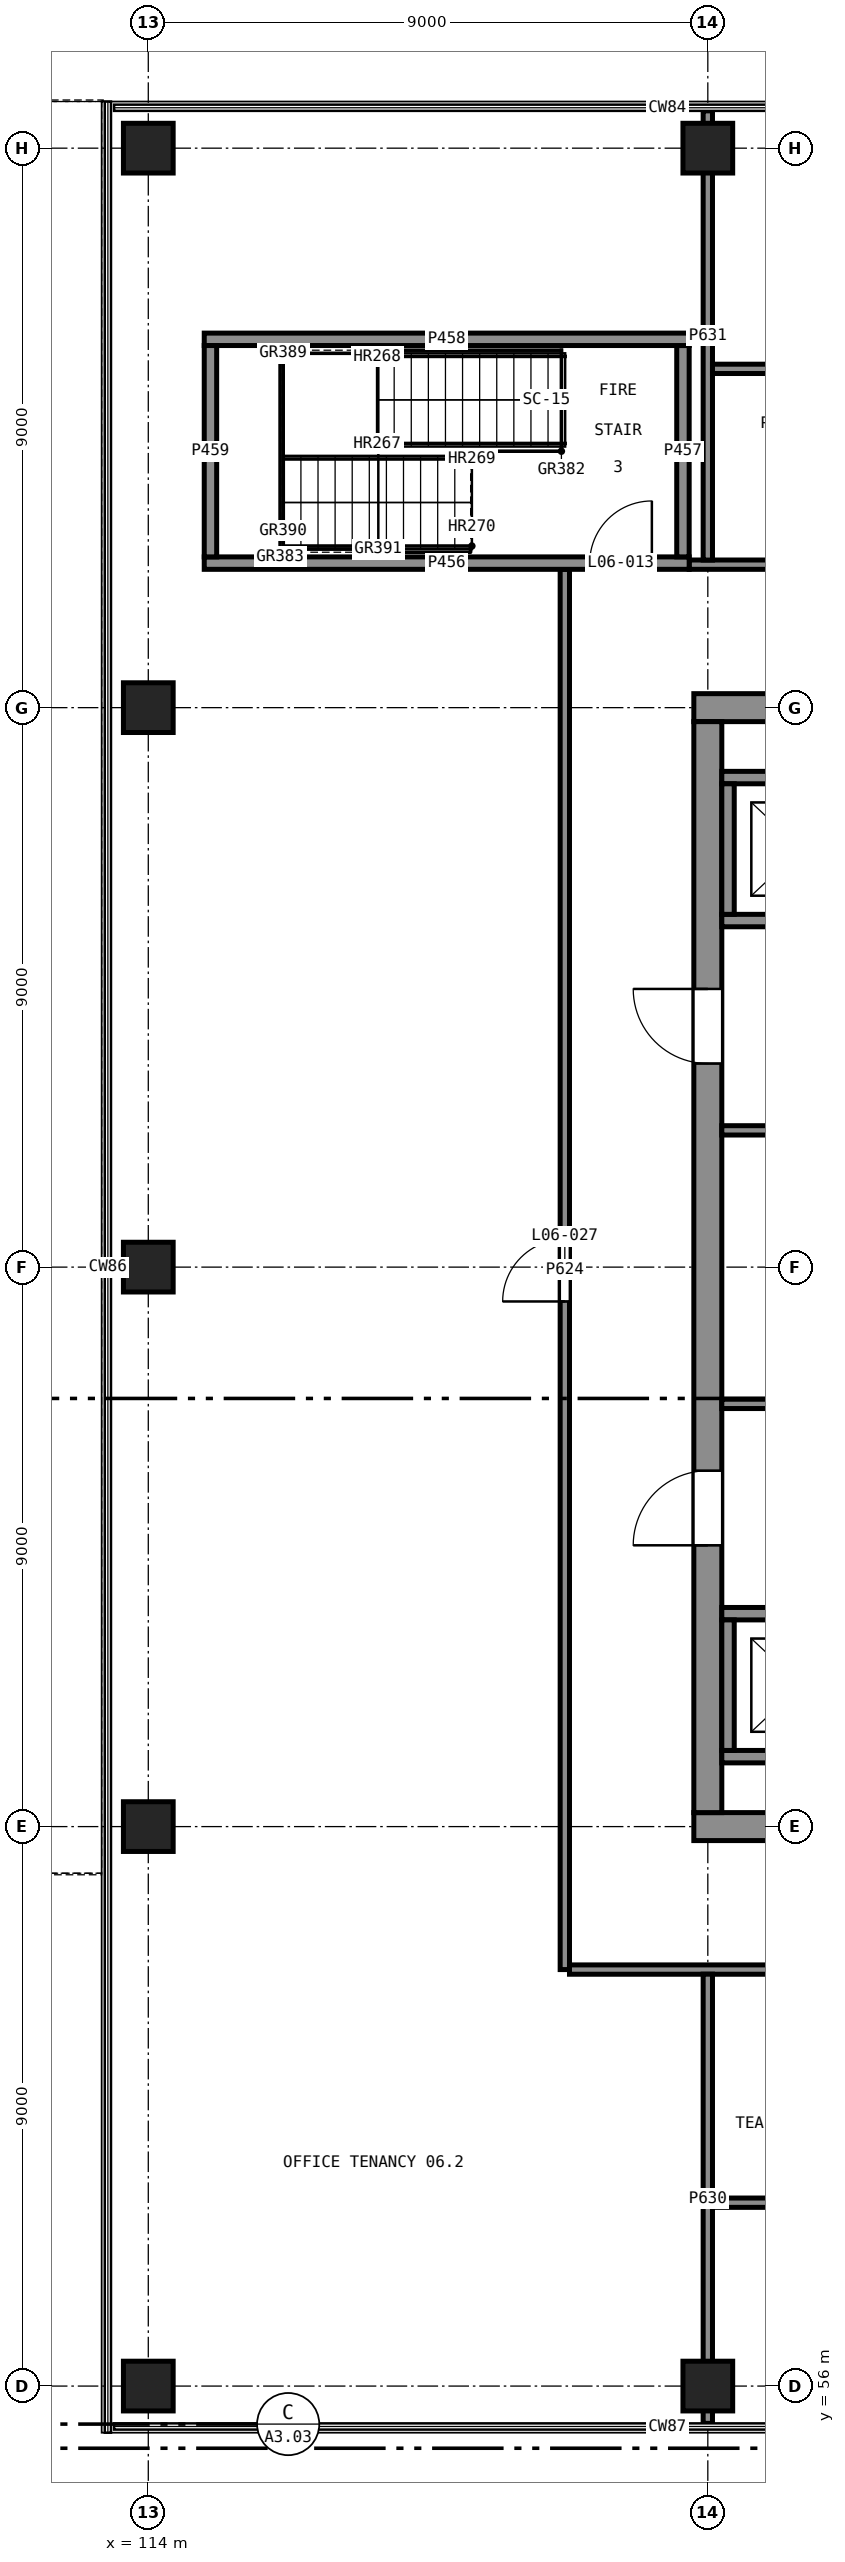
"""IFC4 building model, lengths in metres.
Left out: names, types, materials, properties, quantities, classifications, styles, units other than length and angle.
Written with IfcOpenShell. Run it as: python <this file> out.ifc"""

import sys

from ifc_helpers import new_model, si_unit, direction, frame, frame_2d, origin, origin_2d, place, context, subcontext, project, spatial, rectangle, extrude, element, fill, save


model = new_model("IFC4")
c1 = context("Model", 3, precision=1e-05, world=origin(), true_north=direction((0.0, 1.0)))
c2 = subcontext(c1, "Body", "Model", "MODEL_VIEW")
j1 = project(units=[si_unit("LENGTHUNIT", "METRE"), si_unit("PLANEANGLEUNIT", "RADIAN")], contexts=[c1])
p1 = place(None, origin())
s1 = spatial("IfcSite", under=j1, at=p1, CompositionType="ELEMENT")
p2 = place(p1, origin())
s2 = spatial("IfcBuilding", under=s1, at=p2, CompositionType="ELEMENT")
p3 = place(p2, frame((0.0, 0.0, 25.5)))
s3 = spatial("IfcBuildingStorey", under=s2, at=p3, CompositionType="ELEMENT", Elevation=25.5)
for number, where, z_axis, x_axis in (
    (1, (114.0, 56.0, 0.0), (0.0, 0.0, 1.0), (1.0, 0.0, 0.0)),
    (2, (114.0, 65.0, 0.0), (0.0, 0.0, 1.0), (1.0, 0.0, 0.0)),
    (3, (114.0, 74.0, 0.0), (0.0, 0.0, 1.0), (1.0, 0.0, 0.0)),
    (4, (114.0, 83.0, 0.0), (0.0, 0.0, 1.0), (1.0, 0.0, 0.0)),
    (5, (114.0, 92.0, 0.0), (0.0, 0.0, 1.0), (1.0, 0.0, 0.0)),
    (6, (123.0, 56.0, 0.0), (0.0, 0.0, 1.0), (1.0, 0.0, 0.0)),
    (7, (123.0, 92.0, 0.0), (0.0, 0.0, 1.0), (1.0, 0.0, 0.0)),
):
    element("IfcColumn", number, at=place(p3, frame(where, z_axis=z_axis, x_axis=x_axis)), inside=s3, PredefinedType="COLUMN", context=c2, shape_type="SweptSolid", body=[
        extrude(rectangle(XDim=0.8, YDim=0.8, at=origin_2d()), origin(), (0.0, 0.0, 1.0), 4.0),
    ])
for number, where, z_axis, x_axis in (
    (8, (122.775, 65.0, 0.0), (0.0, 0.0, 1.0), (1.0, 0.0, 0.0)),
    (9, (141.225, 83.0, 0.0), (0.0, 0.0, 1.0), (-1.0, 0.0, 0.0)),
):
    element("IfcWall", number, at=place(p3, frame(where, z_axis=z_axis, x_axis=x_axis)), inside=s3, PredefinedType="SHEAR", context=c2, shape_type="SweptSolid", body=[
        extrude(rectangle(XDim=18.45, YDim=0.45, at=frame_2d((9.225, 0.0))), origin(), (0.0, 0.0, 1.0), 4.0),
    ])
p4 = place(p3, frame((123.0, 82.775, 0.0), z_axis=(0.0, 0.0, 1.0), x_axis=(0.0, -1.0, 0.0)))
e10 = element("IfcWall", 10, at=p4, inside=s3, PredefinedType="SHEAR", context=c2, shape_type="SweptSolid", body=[
    extrude(rectangle(XDim=17.55, YDim=0.45, at=frame_2d((8.775, 0.0))), origin(), (0.0, 0.0, 1.0), 4.0),
])
p5 = place(p4, frame((12.05, 0.0, 0.0)))
e11 = element("IfcOpeningElement", 11, at=p5, cuts=e10, PredefinedType="OPENING", context=c2, shape_type="SweptSolid", body=[
    extrude(rectangle(XDim=1.2, YDim=2.1, at=frame_2d((0.6, 1.05))), frame((0.0, 0.235, 0.0), z_axis=(0.0, -1.0, 0.0), x_axis=(1.0, 0.0, 0.0)), (0.0, 0.0, 1.0), 0.47),
])
p6 = place(p4, frame((4.3, 0.0, 0.0)))
e12 = element("IfcOpeningElement", 12, at=p6, cuts=e10, PredefinedType="OPENING", context=c2, shape_type="SweptSolid", body=[
    extrude(rectangle(XDim=1.2, YDim=2.1, at=frame_2d((0.6, 1.05))), frame((0.0, 0.235, 0.0), z_axis=(0.0, -1.0, 0.0), x_axis=(1.0, 0.0, 0.0)), (0.0, 0.0, 1.0), 0.47),
])
p7 = place(p3, frame((123.225, 66.125, 0.0), z_axis=(0.0, 0.0, 1.0), x_axis=(1.0, 0.0, 0.0)))
e13 = element("IfcWall", 13, at=p7, inside=s3, PredefinedType="SHEAR", context=c2, shape_type="SweptSolid", body=[
    extrude(rectangle(XDim=2.55, YDim=0.2, at=frame_2d((1.275, 0.0))), origin(), (0.0, 0.0, 1.0), 4.0),
])
p8 = place(p3, frame((125.775, 68.425, 0.0), z_axis=(0.0, 0.0, 1.0), x_axis=(-1.0, 0.0, 0.0)))
e14 = element("IfcWall", 14, at=p8, inside=s3, PredefinedType="SHEAR", context=c2, shape_type="SweptSolid", body=[
    extrude(rectangle(XDim=2.55, YDim=0.2, at=frame_2d((1.275, 0.0))), origin(), (0.0, 0.0, 1.0), 4.0),
])
p9 = place(p8, frame((0.725, 0.0, 0.0)))
e15 = element("IfcOpeningElement", 15, at=p9, cuts=e14, PredefinedType="OPENING", context=c2, shape_type="SweptSolid", body=[
    extrude(rectangle(XDim=1.1, YDim=2.1, at=frame_2d((0.55, 1.05))), frame((0.0, 0.11, 0.0), z_axis=(0.0, -1.0, 0.0), x_axis=(1.0, 0.0, 0.0)), (0.0, 0.0, 1.0), 0.22),
])
p10 = place(p3, frame((123.325, 68.325, 0.0), z_axis=(0.0, 0.0, 1.0), x_axis=(0.0, -1.0, 0.0)))
e16 = element("IfcWall", 16, at=p10, inside=s3, PredefinedType="SHEAR", context=c2, shape_type="SweptSolid", body=[
    extrude(rectangle(XDim=2.1, YDim=0.2, at=frame_2d((1.05, 0.0))), origin(), (0.0, 0.0, 1.0), 4.0),
])
for number, where, z_axis, x_axis in (
    (17, (123.225, 79.575, 0.0), (0.0, 0.0, 1.0), (1.0, 0.0, 0.0)),
    (18, (125.775, 81.875, 0.0), (0.0, 0.0, 1.0), (-1.0, 0.0, 0.0)),
):
    element("IfcWall", number, at=place(p3, frame(where, z_axis=z_axis, x_axis=x_axis)), inside=s3, PredefinedType="SHEAR", context=c2, shape_type="SweptSolid", body=[
        extrude(rectangle(XDim=2.55, YDim=0.2, at=frame_2d((1.275, 0.0))), origin(), (0.0, 0.0, 1.0), 4.0),
    ])
p11 = place(p3, frame((123.325, 81.775, 0.0), z_axis=(0.0, 0.0, 1.0), x_axis=(0.0, -1.0, 0.0)))
e19 = element("IfcWall", 19, at=p11, inside=s3, PredefinedType="SHEAR", context=c2, shape_type="SweptSolid", body=[
    extrude(rectangle(XDim=2.1, YDim=0.2, at=frame_2d((1.05, 0.0))), origin(), (0.0, 0.0, 1.0), 4.0),
])
p12 = place(p3, frame((114.9, 85.325, 0.0), z_axis=(0.0, 0.0, 1.0), x_axis=(1.0, 0.0, 0.0)))
e20 = element("IfcWall", 20, at=p12, inside=s3, PredefinedType="SHEAR", context=c2, shape_type="SweptSolid", body=[
    extrude(rectangle(XDim=7.8, YDim=0.2, at=frame_2d((3.9, 0.0))), origin(), (0.0, 0.0, 1.0), 3.58),
])
p13 = place(p12, frame((6.2, 0.0, 0.0)))
e21 = element("IfcOpeningElement", 21, at=p13, cuts=e20, PredefinedType="OPENING", context=c2, shape_type="SweptSolid", body=[
    extrude(rectangle(XDim=1.0, YDim=2.1, at=frame_2d((0.5, 1.05))), frame((0.0, 0.11, 0.0), z_axis=(0.0, -1.0, 0.0), x_axis=(1.0, 0.0, 0.0)), (0.0, 0.0, 1.0), 0.22),
])
p14 = place(p3, frame((122.6, 85.425, 0.0), z_axis=(0.0, 0.0, 1.0), x_axis=(0.0, 1.0, 0.0)))
e22 = element("IfcWall", 22, at=p14, inside=s3, PredefinedType="SHEAR", context=c2, shape_type="SweptSolid", body=[
    extrude(rectangle(XDim=3.4, YDim=0.2, at=frame_2d((1.7, 0.0))), origin(), (0.0, 0.0, 1.0), 3.58),
])
p15 = place(p3, frame((122.7, 88.925, 0.0), z_axis=(0.0, 0.0, 1.0), x_axis=(-1.0, 0.0, 0.0)))
e23 = element("IfcWall", 23, at=p15, inside=s3, PredefinedType="SHEAR", context=c2, shape_type="SweptSolid", body=[
    extrude(rectangle(XDim=7.8, YDim=0.2, at=frame_2d((3.9, 0.0))), origin(), (0.0, 0.0, 1.0), 3.58),
])
p16 = place(p3, frame((115.0, 88.825, 0.0), z_axis=(0.0, 0.0, 1.0), x_axis=(0.0, -1.0, 0.0)))
e24 = element("IfcWall", 24, at=p16, inside=s3, PredefinedType="SHEAR", context=c2, shape_type="SweptSolid", body=[
    extrude(rectangle(XDim=3.4, YDim=0.2, at=frame_2d((1.7, 0.0))), origin(), (0.0, 0.0, 1.0), 3.58),
])
p17 = place(p3, frame((123.225, 71.8, 0.0), z_axis=(0.0, 0.0, 1.0), x_axis=(1.0, 0.0, 0.0)))
e25 = element("IfcWall", 25, at=p17, inside=s3, PredefinedType="PARTITIONING", context=c2, shape_type="SweptSolid", body=[
    extrude(rectangle(XDim=3.825, YDim=0.15, at=frame_2d((1.913, 0.0))), origin(), (0.0, 0.0, 1.0), 3.58),
])
p18 = place(p17, frame((1.5, 0.0, 0.0)))
e26 = element("IfcOpeningElement", 26, at=p18, cuts=e25, PredefinedType="OPENING", context=c2, shape_type="SweptSolid", body=[
    extrude(rectangle(XDim=0.9, YDim=2.1, at=frame_2d((0.45, 1.05))), frame((0.0, 0.085, 0.0), z_axis=(0.0, -1.0, 0.0), x_axis=(1.0, 0.0, 0.0)), (0.0, 0.0, 1.0), 0.17),
])
p19 = place(p3, frame((123.225, 76.2, 0.0), z_axis=(0.0, 0.0, 1.0), x_axis=(1.0, 0.0, 0.0)))
e27 = element("IfcWall", 27, at=p19, inside=s3, PredefinedType="PARTITIONING", context=c2, shape_type="SweptSolid", body=[
    extrude(rectangle(XDim=3.825, YDim=0.15, at=frame_2d((1.913, 0.0))), origin(), (0.0, 0.0, 1.0), 3.58),
])
p20 = place(p3, frame((120.7, 62.7, 0.0), z_axis=(0.0, 0.0, 1.0), x_axis=(0.0, 1.0, 0.0)))
e28 = element("IfcWall", 28, at=p20, inside=s3, PredefinedType="PARTITIONING", context=c2, shape_type="SweptSolid", body=[
    extrude(rectangle(XDim=22.525, YDim=0.15, at=frame_2d((11.263, 0.0))), origin(), (0.0, 0.0, 1.0), 3.58),
])
p21 = place(p20, frame((10.748, 0.0, 0.0)))
e29 = element("IfcOpeningElement", 29, at=p21, cuts=e28, PredefinedType="OPENING", context=c2, shape_type="SweptSolid", body=[
    extrude(rectangle(XDim=1.0, YDim=2.1, at=frame_2d((0.5, 1.05))), frame((0.0, 0.085, 0.0), z_axis=(0.0, -1.0, 0.0), x_axis=(1.0, 0.0, 0.0)), (0.0, 0.0, 1.0), 0.17),
])
p22 = place(p3, frame((132.6, 62.7, 0.0), z_axis=(0.0, 0.0, 1.0), x_axis=(-1.0, 0.0, 0.0)))
e30 = element("IfcWall", 30, at=p22, inside=s3, PredefinedType="PARTITIONING", context=c2, shape_type="SweptSolid", body=[
    extrude(rectangle(XDim=11.825, YDim=0.15, at=frame_2d((5.913, 0.0))), origin(), (0.0, 0.0, 1.0), 3.58),
])
p23 = place(p22, frame((7.525, 0.0, 0.0)))
e31 = element("IfcOpeningElement", 31, at=p23, cuts=e30, PredefinedType="OPENING", context=c2, shape_type="SweptSolid", body=[
    extrude(rectangle(XDim=1.0, YDim=2.1, at=frame_2d((0.5, 1.05))), frame((0.0, 0.085, 0.0), z_axis=(0.0, -1.0, 0.0), x_axis=(1.0, 0.0, 0.0)), (0.0, 0.0, 1.0), 0.17),
])
p24 = place(p3, frame((122.7, 85.3, 0.0), z_axis=(0.0, 0.0, 1.0), x_axis=(1.0, 0.0, 0.0)))
e32 = element("IfcWall", 32, at=p24, inside=s3, PredefinedType="PARTITIONING", context=c2, shape_type="SweptSolid", body=[
    extrude(rectangle(XDim=9.9, YDim=0.15, at=frame_2d((4.95, 0.0))), origin(), (0.0, 0.0, 1.0), 3.58),
])
p25 = place(p24, frame((1.675, 0.0, 0.0)))
e33 = element("IfcOpeningElement", 33, at=p25, cuts=e32, PredefinedType="OPENING", context=c2, shape_type="SweptSolid", body=[
    extrude(rectangle(XDim=1.0, YDim=2.1, at=frame_2d((0.5, 1.05))), frame((0.0, 0.085, 0.0), z_axis=(0.0, -1.0, 0.0), x_axis=(1.0, 0.0, 0.0)), (0.0, 0.0, 1.0), 0.17),
])
p26 = place(p24, frame((6.498, 0.0, 0.0)))
e34 = element("IfcOpeningElement", 34, at=p26, cuts=e32, PredefinedType="OPENING", context=c2, shape_type="SweptSolid", body=[
    extrude(rectangle(XDim=1.0, YDim=2.1, at=frame_2d((0.5, 1.05))), frame((0.0, 0.085, 0.0), z_axis=(0.0, -1.0, 0.0), x_axis=(1.0, 0.0, 0.0)), (0.0, 0.0, 1.0), 0.17),
])
for number, where, z_axis, x_axis in (
    (35, (123.0, 55.4, 0.0), (0.0, 0.0, 1.0), (0.0, 1.0, 0.0)),
    (36, (123.0, 85.374, 0.0), (0.0, 0.0, 1.0), (0.0, 1.0, 0.0)),
):
    element("IfcWall", number, at=place(p3, frame(where, z_axis=z_axis, x_axis=x_axis)), inside=s3, PredefinedType="PARTITIONING", context=c2, shape_type="SweptSolid", body=[
        extrude(rectangle(XDim=7.226, YDim=0.15, at=frame_2d((3.613, 0.0))), origin(), (0.0, 0.0, 1.0), 2.68),
    ])
p27 = place(p3, frame((123.075, 58.95, 0.0), z_axis=(0.0, 0.0, 1.0), x_axis=(1.0, 0.0, 0.0)))
e37 = element("IfcWall", 37, at=p27, inside=s3, PredefinedType="PARTITIONING", context=c2, shape_type="SweptSolid", body=[
    extrude(rectangle(XDim=3.0, YDim=0.15, at=frame_2d((1.5, 0.0))), origin(), (0.0, 0.0, 1.0), 3.58),
])
p28 = place(p3, frame((123.075, 88.45, 0.0), z_axis=(0.0, 0.0, 1.0), x_axis=(1.0, 0.0, 0.0)))
e38 = element("IfcWall", 38, at=p28, inside=s3, PredefinedType="PARTITIONING", context=c2, shape_type="SweptSolid", body=[
    extrude(rectangle(XDim=3.6, YDim=0.15, at=frame_2d((1.8, 0.0))), origin(), (0.0, 0.0, 1.0), 3.58),
])
p29 = place(p13, origin())
e39 = element("IfcDoor", 39, at=p29, inside=s3, OperationType="SINGLE_SWING_LEFT", PredefinedType="DOOR", context=c2, shape_type="SweptSolid", body=[
    extrude(rectangle(XDim=1.0, YDim=2.1, at=frame_2d((0.5, 1.05))), frame((0.0, 0.025, 0.0), z_axis=(0.0, -1.0, 0.0), x_axis=(1.0, 0.0, 0.0)), (0.0, 0.0, 1.0), 0.05),
])
fill(e21, e39)
p30 = place(p5, frame((1.2, 0.0, 0.0), z_axis=(0.0, 0.0, 1.0), x_axis=(-1.0, 0.0, 0.0)))
e40 = element("IfcDoor", 40, at=p30, inside=s3, OperationType="SINGLE_SWING_RIGHT", PredefinedType="DOOR", context=c2, shape_type="SweptSolid", body=[
    extrude(rectangle(XDim=1.2, YDim=2.1, at=frame_2d((0.6, 1.05))), frame((0.0, 0.025, 0.0), z_axis=(0.0, -1.0, 0.0), x_axis=(1.0, 0.0, 0.0)), (0.0, 0.0, 1.0), 0.05),
])
fill(e11, e40)
p31 = place(p6, frame((1.2, 0.0, 0.0), z_axis=(0.0, 0.0, 1.0), x_axis=(-1.0, 0.0, 0.0)))
e41 = element("IfcDoor", 41, at=p31, inside=s3, OperationType="SINGLE_SWING_LEFT", PredefinedType="DOOR", context=c2, shape_type="SweptSolid", body=[
    extrude(rectangle(XDim=1.2, YDim=2.1, at=frame_2d((0.6, 1.05))), frame((0.0, 0.025, 0.0), z_axis=(0.0, -1.0, 0.0), x_axis=(1.0, 0.0, 0.0)), (0.0, 0.0, 1.0), 0.05),
])
fill(e12, e41)
p32 = place(p21, origin())
e42 = element("IfcDoor", 42, at=p32, inside=s3, OperationType="SINGLE_SWING_RIGHT", PredefinedType="DOOR", context=c2, shape_type="SweptSolid", body=[
    extrude(rectangle(XDim=1.0, YDim=2.1, at=frame_2d((0.5, 1.05))), frame((0.0, 0.025, 0.0), z_axis=(0.0, -1.0, 0.0), x_axis=(1.0, 0.0, 0.0)), (0.0, 0.0, 1.0), 0.05),
])
fill(e29, e42)
save(model, sys.argv[1])
